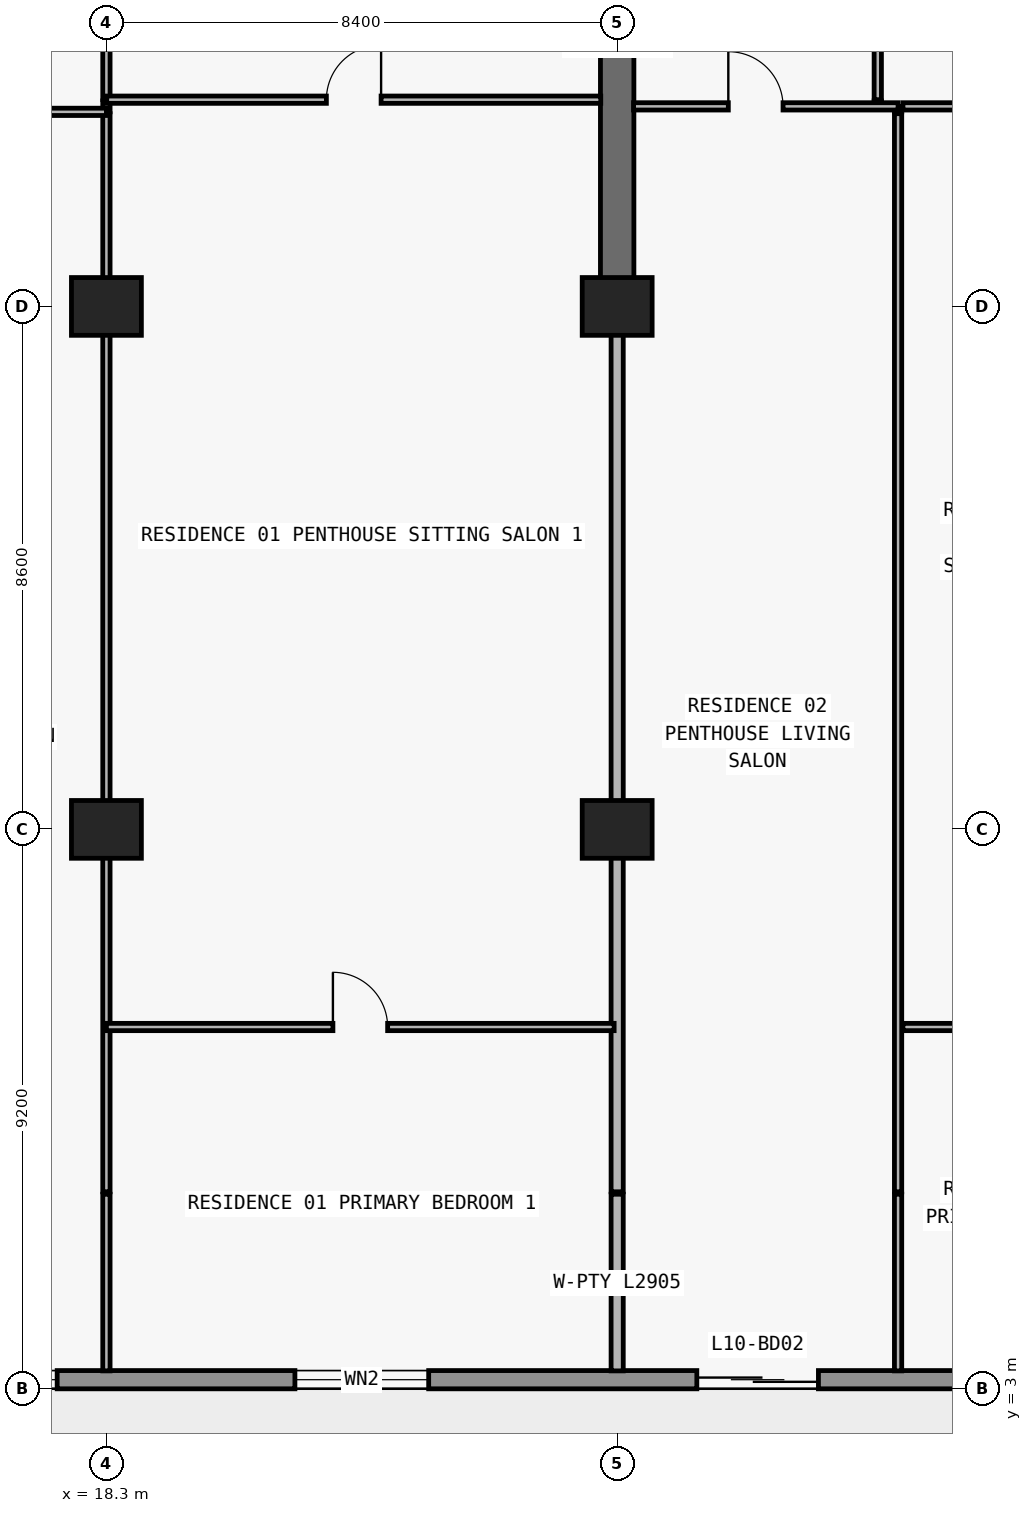
"""IFC4 building model, lengths in metres.
Left out: names, types, materials, properties, quantities, classifications, styles, units other than length and angle.
Written with IfcOpenShell. Run it as: python <this file> out.ifc"""

import sys

from ifc_helpers import new_model, si_unit, direction, frame, frame_2d, origin, origin_2d, place, context, subcontext, project, spatial, rectangle, extrude, element, fill, save


model = new_model("IFC4")
c1 = context("Model", 3, precision=1e-05, world=origin(), true_north=direction((0.0, 1.0)))
c2 = subcontext(c1, "Body", "Model", "MODEL_VIEW")
j1 = project(units=[si_unit("LENGTHUNIT", "METRE"), si_unit("PLANEANGLEUNIT", "RADIAN")], contexts=[c1])
p1 = place(None, origin())
s1 = spatial("IfcSite", under=j1, at=p1, CompositionType="ELEMENT")
p2 = place(p1, origin())
s2 = spatial("IfcBuilding", under=s1, at=p2, CompositionType="ELEMENT")
p3 = place(p2, frame((0.0, 0.0, 43.2)))
s3 = spatial("IfcBuildingStorey", under=s2, at=p3, CompositionType="ELEMENT", Elevation=43.2)
for number, where, z_axis, x_axis in (
    (1, (18.3, 12.2, 0.0), (0.0, 0.0, 1.0), (1.0, 0.0, 0.0)),
    (2, (26.7, 12.2, 0.0), (0.0, 0.0, 1.0), (1.0, 0.0, 0.0)),
    (3, (18.3, 20.8, 0.0), (0.0, 0.0, 1.0), (1.0, 0.0, 0.0)),
    (4, (26.7, 20.8, 0.0), (0.0, 0.0, 1.0), (1.0, 0.0, 0.0)),
):
    element("IfcColumn", number, at=place(p3, frame(where, z_axis=z_axis, x_axis=x_axis)), inside=s3, PredefinedType="COLUMN", context=c2, shape_type="SweptSolid", body=[
        extrude(rectangle(XDim=1.15, YDim=0.95, at=origin_2d()), origin(), (0.0, 0.0, 1.0), 3.05),
    ])
p4 = place(p3, frame((26.7, 20.8, 0.0), z_axis=(0.0, 0.0, 1.0), x_axis=(0.0, 1.0, 0.0)))
e5 = element("IfcWall", 5, at=p4, inside=s3, PredefinedType="SHEAR", context=c2, shape_type="SweptSolid", body=[
    extrude(rectangle(XDim=8.6, YDim=0.55, at=frame_2d((4.3, 0.0))), origin(), (0.0, 0.0, 1.0), 3.05),
])
p5 = place(p3, frame((72.7, 3.15, 0.0), z_axis=(0.0, 0.0, 1.0), x_axis=(-1.0, 0.0, 0.0)))
e6 = element("IfcWall", 6, at=p5, inside=s3, PredefinedType="STANDARD", context=c2, shape_type="SweptSolid", body=[
    extrude(rectangle(XDim=67.6, YDim=0.3, at=frame_2d((33.8, 0.0))), origin(), (0.0, 0.0, 1.0), 3.05),
])
p6 = place(p5, frame((59.89, 0.0, 0.0)))
e7 = element("IfcOpeningElement", 7, at=p6, cuts=e6, PredefinedType="OPENING", context=c2, shape_type="SweptSolid", body=[
    extrude(rectangle(XDim=2.0, YDim=2.3, at=frame_2d((1.0, 1.15))), frame((0.0, 0.16, 0.0), z_axis=(0.0, -1.0, 0.0), x_axis=(1.0, 0.0, 0.0)), (0.0, 0.0, 1.0), 0.32),
])
p7 = place(p5, frame((55.21, 0.0, 0.65)))
e8 = element("IfcOpeningElement", 8, at=p7, cuts=e6, PredefinedType="OPENING", context=c2, shape_type="SweptSolid", body=[
    extrude(rectangle(XDim=2.6, YDim=1.85, at=frame_2d((1.3, 0.925))), frame((0.0, 0.16, 0.0), z_axis=(0.0, -1.0, 0.0), x_axis=(1.0, 0.0, 0.0)), (0.0, 0.0, 1.0), 0.32),
])
p8 = place(p5, frame((49.1, 0.0, 0.85)))
e9 = element("IfcOpeningElement", 9, at=p8, cuts=e6, PredefinedType="OPENING", context=c2, shape_type="SweptSolid", body=[
    extrude(rectangle(XDim=2.2, YDim=1.55, at=frame_2d((1.1, 0.775))), frame((0.0, 0.16, 0.0), z_axis=(0.0, -1.0, 0.0), x_axis=(1.0, 0.0, 0.0)), (0.0, 0.0, 1.0), 0.32),
])
p9 = place(p5, frame((42.69, 0.0, 0.0)))
e10 = element("IfcOpeningElement", 10, at=p9, cuts=e6, PredefinedType="OPENING", context=c2, shape_type="SweptSolid", body=[
    extrude(rectangle(XDim=2.0, YDim=2.3, at=frame_2d((1.0, 1.15))), frame((0.0, 0.16, 0.0), z_axis=(0.0, -1.0, 0.0), x_axis=(1.0, 0.0, 0.0)), (0.0, 0.0, 1.0), 0.32),
])
p10 = place(p5, frame((38.59, 0.0, 0.85)))
e11 = element("IfcOpeningElement", 11, at=p10, cuts=e6, PredefinedType="OPENING", context=c2, shape_type="SweptSolid", body=[
    extrude(rectangle(XDim=1.8, YDim=1.55, at=frame_2d((0.9, 0.775))), frame((0.0, 0.16, 0.0), z_axis=(0.0, -1.0, 0.0), x_axis=(1.0, 0.0, 0.0)), (0.0, 0.0, 1.0), 0.32),
])
p11 = place(p5, frame((30.914, 0.0, 0.85)))
e12 = element("IfcOpeningElement", 12, at=p11, cuts=e6, PredefinedType="OPENING", context=c2, shape_type="SweptSolid", body=[
    extrude(rectangle(XDim=2.2, YDim=1.55, at=frame_2d((1.1, 0.775))), frame((0.0, 0.16, 0.0), z_axis=(0.0, -1.0, 0.0), x_axis=(1.0, 0.0, 0.0)), (0.0, 0.0, 1.0), 0.32),
])
p12 = place(p5, frame((26.69, 0.0, 0.0)))
e13 = element("IfcOpeningElement", 13, at=p12, cuts=e6, PredefinedType="OPENING", context=c2, shape_type="SweptSolid", body=[
    extrude(rectangle(XDim=2.0, YDim=2.3, at=frame_2d((1.0, 1.15))), frame((0.0, 0.16, 0.0), z_axis=(0.0, -1.0, 0.0), x_axis=(1.0, 0.0, 0.0)), (0.0, 0.0, 1.0), 0.32),
])
p13 = place(p5, frame((22.59, 0.0, 0.85)))
e14 = element("IfcOpeningElement", 14, at=p13, cuts=e6, PredefinedType="OPENING", context=c2, shape_type="SweptSolid", body=[
    extrude(rectangle(XDim=1.8, YDim=1.55, at=frame_2d((0.9, 0.775))), frame((0.0, 0.16, 0.0), z_axis=(0.0, -1.0, 0.0), x_axis=(1.0, 0.0, 0.0)), (0.0, 0.0, 1.0), 0.32),
])
p14 = place(p5, frame((18.69, 0.0, 0.0)))
e15 = element("IfcOpeningElement", 15, at=p14, cuts=e6, PredefinedType="OPENING", context=c2, shape_type="SweptSolid", body=[
    extrude(rectangle(XDim=2.0, YDim=2.3, at=frame_2d((1.0, 1.15))), frame((0.0, 0.16, 0.0), z_axis=(0.0, -1.0, 0.0), x_axis=(1.0, 0.0, 0.0)), (0.0, 0.0, 1.0), 0.32),
])
p15 = place(p5, frame((14.01, 0.0, 0.65)))
e16 = element("IfcOpeningElement", 16, at=p15, cuts=e6, PredefinedType="OPENING", context=c2, shape_type="SweptSolid", body=[
    extrude(rectangle(XDim=2.6, YDim=1.85, at=frame_2d((1.3, 0.925))), frame((0.0, 0.16, 0.0), z_axis=(0.0, -1.0, 0.0), x_axis=(1.0, 0.0, 0.0)), (0.0, 0.0, 1.0), 0.32),
])
p16 = place(p5, frame((7.9, 0.0, 0.85)))
e17 = element("IfcOpeningElement", 17, at=p16, cuts=e6, PredefinedType="OPENING", context=c2, shape_type="SweptSolid", body=[
    extrude(rectangle(XDim=2.2, YDim=1.55, at=frame_2d((1.1, 0.775))), frame((0.0, 0.16, 0.0), z_axis=(0.0, -1.0, 0.0), x_axis=(1.0, 0.0, 0.0)), (0.0, 0.0, 1.0), 0.32),
])
p17 = place(p3, frame((18.3, 3.295, 0.0), z_axis=(0.0, 0.0, 1.0), x_axis=(0.0, 1.0, 0.0)))
e18 = element("IfcWall", 18, at=p17, inside=s3, PredefinedType="PARTITIONING", context=c2, shape_type="SweptSolid", body=[
    extrude(rectangle(XDim=2.905, YDim=0.12, at=frame_2d((1.453, 0.0))), origin(), (0.0, 0.0, 1.0), 3.05),
])
p18 = place(p3, frame((18.3, 6.24, 0.0), z_axis=(0.0, 0.0, 1.0), x_axis=(0.0, 1.0, 0.0)))
e19 = element("IfcWall", 19, at=p18, inside=s3, PredefinedType="PARTITIONING", context=c2, shape_type="SweptSolid", body=[
    extrude(rectangle(XDim=17.73, YDim=0.12, at=frame_2d((8.865, 0.0))), origin(), (0.0, 0.0, 1.0), 2.11),
])
p19 = place(p3, frame((18.3, 24.0, 0.0), z_axis=(0.0, 0.0, 1.0), x_axis=(0.0, 1.0, 0.0)))
e20 = element("IfcWall", 20, at=p19, inside=s3, PredefinedType="PARTITIONING", context=c2, shape_type="SweptSolid", body=[
    extrude(rectangle(XDim=0.18, YDim=0.12, at=frame_2d((0.09, 0.0))), origin(), (0.0, 0.0, 1.0), 2.11),
])
p20 = place(p3, frame((18.3, 24.2, 0.0), z_axis=(0.0, 0.0, 1.0), x_axis=(0.0, 1.0, 0.0)))
e21 = element("IfcWall", 21, at=p20, inside=s3, PredefinedType="PARTITIONING", context=c2, shape_type="SweptSolid", body=[
    extrude(rectangle(XDim=4.38, YDim=0.12, at=frame_2d((2.19, 0.0))), origin(), (0.0, 0.0, 1.0), 2.11),
])
p21 = place(p20, frame((1.74, 0.0, 0.0)))
e22 = element("IfcOpeningElement", 22, at=p21, cuts=e21, PredefinedType="OPENING", context=c2, shape_type="SweptSolid", body=[
    extrude(rectangle(XDim=0.9, YDim=2.06, at=frame_2d((0.45, 1.03))), frame((0.0, 0.07, 0.0), z_axis=(0.0, -1.0, 0.0), x_axis=(1.0, 0.0, 0.0)), (0.0, 0.0, 1.0), 0.14),
])
p22 = place(p3, frame((26.7, 3.295, 0.0), z_axis=(0.0, 0.0, 1.0), x_axis=(0.0, 1.0, 0.0)))
e23 = element("IfcWall", 23, at=p22, inside=s3, PredefinedType="PARTITIONING", context=c2, shape_type="SweptSolid", body=[
    extrude(rectangle(XDim=2.905, YDim=0.2, at=frame_2d((1.453, 0.0))), origin(), (0.0, 0.0, 1.0), 3.05),
])
p23 = place(p3, frame((26.7, 6.24, 0.0), z_axis=(0.0, 0.0, 1.0), x_axis=(0.0, 1.0, 0.0)))
e24 = element("IfcWall", 24, at=p23, inside=s3, PredefinedType="PARTITIONING", context=c2, shape_type="SweptSolid", body=[
    extrude(rectangle(XDim=14.555, YDim=0.2, at=frame_2d((7.277, 0.0))), origin(), (0.0, 0.0, 1.0), 2.11),
])
p24 = place(p3, frame((30.986, 24.09, 0.0), z_axis=(0.0, 0.0, 1.0), x_axis=(0.0, 1.0, 0.0)))
e25 = element("IfcWall", 25, at=p24, inside=s3, PredefinedType="PARTITIONING", context=c2, shape_type="SweptSolid", body=[
    extrude(rectangle(XDim=0.09, YDim=0.12, at=frame_2d((0.045, 0.0))), origin(), (0.0, 0.0, 1.0), 3.05),
])
p25 = place(p3, frame((30.986, 24.2, 0.0), z_axis=(0.0, 0.0, 1.0), x_axis=(0.0, 1.0, 0.0)))
e26 = element("IfcWall", 26, at=p25, inside=s3, PredefinedType="PARTITIONING", context=c2, shape_type="SweptSolid", body=[
    extrude(rectangle(XDim=4.38, YDim=0.12, at=frame_2d((2.19, 0.0))), origin(), (0.0, 0.0, 1.0), 3.05),
])
p26 = place(p25, frame((1.74, 0.0, 0.0)))
e27 = element("IfcOpeningElement", 27, at=p26, cuts=e26, PredefinedType="OPENING", context=c2, shape_type="SweptSolid", body=[
    extrude(rectangle(XDim=0.9, YDim=2.15, at=frame_2d((0.45, 1.075))), frame((0.0, 0.07, 0.0), z_axis=(0.0, -1.0, 0.0), x_axis=(1.0, 0.0, 0.0)), (0.0, 0.0, 1.0), 0.14),
])
p27 = place(p3, frame((31.32, 3.295, 0.0), z_axis=(0.0, 0.0, 1.0), x_axis=(0.0, 1.0, 0.0)))
e28 = element("IfcWall", 28, at=p27, inside=s3, PredefinedType="PARTITIONING", context=c2, shape_type="SweptSolid", body=[
    extrude(rectangle(XDim=2.905, YDim=0.12, at=frame_2d((1.453, 0.0))), origin(), (0.0, 0.0, 1.0), 3.05),
])
p28 = place(p3, frame((31.32, 6.24, 0.0), z_axis=(0.0, 0.0, 1.0), x_axis=(0.0, 1.0, 0.0)))
e29 = element("IfcWall", 29, at=p28, inside=s3, PredefinedType="PARTITIONING", context=c2, shape_type="SweptSolid", body=[
    extrude(rectangle(XDim=17.73, YDim=0.12, at=frame_2d((8.865, 0.0))), origin(), (0.0, 0.0, 1.0), 3.05),
])
p29 = place(p3, frame((31.32, 24.0, 0.0), z_axis=(0.0, 0.0, 1.0), x_axis=(0.0, 1.0, 0.0)))
e30 = element("IfcWall", 30, at=p29, inside=s3, PredefinedType="PARTITIONING", context=c2, shape_type="SweptSolid", body=[
    extrude(rectangle(XDim=0.09, YDim=0.12, at=frame_2d((0.045, 0.0))), origin(), (0.0, 0.0, 1.0), 3.05),
])
p30 = place(p3, frame((18.3, 8.95, 0.0), z_axis=(0.0, 0.0, 1.0), x_axis=(1.0, 0.0, 0.0)))
e31 = element("IfcWall", 31, at=p30, inside=s3, PredefinedType="PARTITIONING", context=c2, shape_type="SweptSolid", body=[
    extrude(rectangle(XDim=8.35, YDim=0.12, at=frame_2d((4.175, 0.0))), origin(), (0.0, 0.0, 1.0), 3.05),
])
p31 = place(p30, frame((3.725, 0.0, 0.0)))
e32 = element("IfcOpeningElement", 32, at=p31, cuts=e31, PredefinedType="OPENING", context=c2, shape_type="SweptSolid", body=[
    extrude(rectangle(XDim=0.9, YDim=2.15, at=frame_2d((0.45, 1.075))), frame((0.0, 0.07, 0.0), z_axis=(0.0, -1.0, 0.0), x_axis=(1.0, 0.0, 0.0)), (0.0, 0.0, 1.0), 0.14),
])
p32 = place(p3, frame((31.4, 8.95, 0.0), z_axis=(0.0, 0.0, 1.0), x_axis=(1.0, 0.0, 0.0)))
e33 = element("IfcWall", 33, at=p32, inside=s3, PredefinedType="PARTITIONING", context=c2, shape_type="SweptSolid", body=[
    extrude(rectangle(XDim=3.7, YDim=0.12, at=frame_2d((1.85, 0.0))), origin(), (0.0, 0.0, 1.0), 3.05),
])
p33 = place(p32, frame((1.4, 0.0, 0.0)))
e34 = element("IfcOpeningElement", 34, at=p33, cuts=e33, PredefinedType="OPENING", context=c2, shape_type="SweptSolid", body=[
    extrude(rectangle(XDim=0.9, YDim=2.15, at=frame_2d((0.45, 1.075))), frame((0.0, 0.07, 0.0), z_axis=(0.0, -1.0, 0.0), x_axis=(1.0, 0.0, 0.0)), (0.0, 0.0, 1.0), 0.14),
])
p34 = place(p3, frame((9.9, 24.0, 0.0), z_axis=(0.0, 0.0, 1.0), x_axis=(1.0, 0.0, 0.0)))
e35 = element("IfcWall", 35, at=p34, inside=s3, PredefinedType="PARTITIONING", context=c2, shape_type="SweptSolid", body=[
    extrude(rectangle(XDim=8.4, YDim=0.12, at=frame_2d((4.2, 0.0))), origin(), (0.0, 0.0, 1.0), 3.05),
])
p35 = place(p34, frame((1.44, 0.0, 0.0)))
e36 = element("IfcOpeningElement", 36, at=p35, cuts=e35, PredefinedType="OPENING", context=c2, shape_type="SweptSolid", body=[
    extrude(rectangle(XDim=0.9, YDim=2.15, at=frame_2d((0.45, 1.075))), frame((0.0, 0.07, 0.0), z_axis=(0.0, -1.0, 0.0), x_axis=(1.0, 0.0, 0.0)), (0.0, 0.0, 1.0), 0.14),
])
p36 = place(p3, frame((26.97, 24.09, 0.0), z_axis=(0.0, 0.0, 1.0), x_axis=(1.0, 0.0, 0.0)))
e37 = element("IfcWall", 37, at=p36, inside=s3, PredefinedType="PARTITIONING", context=c2, shape_type="SweptSolid", body=[
    extrude(rectangle(XDim=4.35, YDim=0.12, at=frame_2d((2.175, 0.0))), origin(), (0.0, 0.0, 1.0), 3.05),
])
p37 = place(p36, frame((1.558, 0.0, 0.0)))
e38 = element("IfcOpeningElement", 38, at=p37, cuts=e37, PredefinedType="OPENING", context=c2, shape_type="SweptSolid", body=[
    extrude(rectangle(XDim=0.9, YDim=2.15, at=frame_2d((0.45, 1.075))), frame((0.0, 0.07, 0.0), z_axis=(0.0, -1.0, 0.0), x_axis=(1.0, 0.0, 0.0)), (0.0, 0.0, 1.0), 0.14),
])
p38 = place(p3, frame((31.4, 24.09, 0.0), z_axis=(0.0, 0.0, 1.0), x_axis=(1.0, 0.0, 0.0)))
e39 = element("IfcWall", 39, at=p38, inside=s3, PredefinedType="PARTITIONING", context=c2, shape_type="SweptSolid", body=[
    extrude(rectangle(XDim=3.7, YDim=0.12, at=frame_2d((1.85, 0.0))), origin(), (0.0, 0.0, 1.0), 3.05),
])
p39 = place(p38, frame((1.4, 0.0, 0.0)))
e40 = element("IfcOpeningElement", 40, at=p39, cuts=e39, PredefinedType="OPENING", context=c2, shape_type="SweptSolid", body=[
    extrude(rectangle(XDim=0.9, YDim=2.15, at=frame_2d((0.45, 1.075))), frame((0.0, 0.07, 0.0), z_axis=(0.0, -1.0, 0.0), x_axis=(1.0, 0.0, 0.0)), (0.0, 0.0, 1.0), 0.14),
])
p40 = place(p3, frame((18.305, 24.2, 0.0), z_axis=(0.0, 0.0, 1.0), x_axis=(1.0, 0.0, 0.0)))
e41 = element("IfcWall", 41, at=p40, inside=s3, PredefinedType="PARTITIONING", context=c2, shape_type="SweptSolid", body=[
    extrude(rectangle(XDim=8.125, YDim=0.12, at=frame_2d((4.062, 0.0))), origin(), (0.0, 0.0, 1.0), 3.05),
])
p41 = place(p40, frame((3.613, 0.0, 0.0)))
e42 = element("IfcOpeningElement", 42, at=p41, cuts=e41, PredefinedType="OPENING", context=c2, shape_type="SweptSolid", body=[
    extrude(rectangle(XDim=0.9, YDim=2.15, at=frame_2d((0.45, 1.075))), frame((0.0, 0.07, 0.0), z_axis=(0.0, -1.0, 0.0), x_axis=(1.0, 0.0, 0.0)), (0.0, 0.0, 1.0), 0.14),
])
p42 = place(p7, origin())
e43 = element("IfcWindow", 43, at=p42, inside=s3, PartitioningType="SINGLE_PANEL", PredefinedType="WINDOW", context=c2, shape_type="SweptSolid", body=[
    extrude(rectangle(XDim=2.6, YDim=1.85, at=frame_2d((1.3, 0.925))), frame((0.0, 0.03, 0.0), z_axis=(0.0, -1.0, 0.0), x_axis=(1.0, 0.0, 0.0)), (0.0, 0.0, 1.0), 0.06),
])
fill(e8, e43)
p43 = place(p8, origin())
e44 = element("IfcWindow", 44, at=p43, inside=s3, PartitioningType="SINGLE_PANEL", PredefinedType="WINDOW", context=c2, shape_type="SweptSolid", body=[
    extrude(rectangle(XDim=2.2, YDim=1.55, at=frame_2d((1.1, 0.775))), frame((0.0, 0.03, 0.0), z_axis=(0.0, -1.0, 0.0), x_axis=(1.0, 0.0, 0.0)), (0.0, 0.0, 1.0), 0.06),
])
fill(e9, e44)
p44 = place(p9, origin())
e45 = element("IfcDoor", 45, at=p44, inside=s3, OperationType="DOUBLE_DOOR_SLIDING", PredefinedType="DOOR", context=c2, shape_type="SweptSolid", body=[
    extrude(rectangle(XDim=2.0, YDim=2.3, at=frame_2d((1.0, 1.15))), frame((0.0, 0.025, 0.0), z_axis=(0.0, -1.0, 0.0), x_axis=(1.0, 0.0, 0.0)), (0.0, 0.0, 1.0), 0.05),
])
fill(e10, e45)
p45 = place(p41, origin())
e46 = element("IfcDoor", 46, at=p45, inside=s3, OperationType="SINGLE_SWING_RIGHT", PredefinedType="DOOR", context=c2, shape_type="SweptSolid", body=[
    extrude(rectangle(XDim=0.9, YDim=2.15, at=frame_2d((0.45, 1.075))), frame((0.0, 0.025, 0.0), z_axis=(0.0, -1.0, 0.0), x_axis=(1.0, 0.0, 0.0)), (0.0, 0.0, 1.0), 0.05),
])
fill(e42, e46)
p46 = place(p31, origin())
e47 = element("IfcDoor", 47, at=p46, inside=s3, OperationType="SINGLE_SWING_LEFT", PredefinedType="DOOR", context=c2, shape_type="SweptSolid", body=[
    extrude(rectangle(XDim=0.9, YDim=2.15, at=frame_2d((0.45, 1.075))), frame((0.0, 0.025, 0.0), z_axis=(0.0, -1.0, 0.0), x_axis=(1.0, 0.0, 0.0)), (0.0, 0.0, 1.0), 0.05),
])
fill(e32, e47)
p47 = place(p37, origin())
e48 = element("IfcDoor", 48, at=p47, inside=s3, OperationType="SINGLE_SWING_LEFT", PredefinedType="DOOR", context=c2, shape_type="SweptSolid", body=[
    extrude(rectangle(XDim=0.9, YDim=2.15, at=frame_2d((0.45, 1.075))), frame((0.0, 0.025, 0.0), z_axis=(0.0, -1.0, 0.0), x_axis=(1.0, 0.0, 0.0)), (0.0, 0.0, 1.0), 0.05),
])
fill(e38, e48)
save(model, sys.argv[1])
